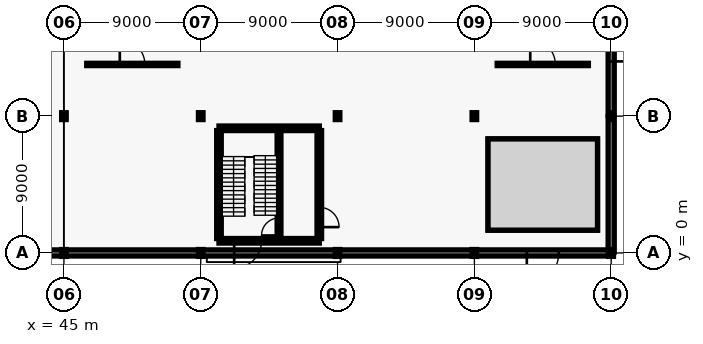
"""IFC4 building model, lengths in metres.
Left out: names, types, materials, properties, quantities, classifications, styles, units other than length and angle.
Written with IfcOpenShell. Run it as: python <this file> out.ifc"""

import sys

from ifc_helpers import new_model, si_unit, direction, frame, frame_2d, origin, origin_2d, place, context, subcontext, project, spatial, rectangle, i_section, extrude, element, fill, save


model = new_model("IFC4")
c1 = context("Model", 3, precision=1e-05, world=origin(), true_north=direction((0.0, 1.0)))
c2 = subcontext(c1, "Body", "Model", "MODEL_VIEW")
j1 = project(units=[si_unit("LENGTHUNIT", "METRE"), si_unit("PLANEANGLEUNIT", "RADIAN")], contexts=[c1])
p1 = place(None, origin())
s1 = spatial("IfcSite", under=j1, at=p1, CompositionType="ELEMENT")
p2 = place(p1, origin())
s2 = spatial("IfcBuilding", under=s1, at=p2, CompositionType="ELEMENT")
p3 = place(p2, origin())
s3 = spatial("IfcBuildingStorey", under=s2, at=p3, CompositionType="ELEMENT", Elevation=0.0)
for number, where, z_axis, x_axis in (
    (1, (45.0, 0.0, 0.0), (0.0, 0.0, 1.0), (1.0, 0.0, 0.0)),
    (2, (45.0, 9.0, 0.0), (0.0, 0.0, 1.0), (1.0, 0.0, 0.0)),
    (3, (54.0, 0.0, 0.0), (0.0, 0.0, 1.0), (1.0, 0.0, 0.0)),
    (4, (54.0, 9.0, 0.0), (0.0, 0.0, 1.0), (1.0, 0.0, 0.0)),
    (5, (63.0, 0.0, 0.0), (0.0, 0.0, 1.0), (1.0, 0.0, 0.0)),
    (6, (63.0, 9.0, 0.0), (0.0, 0.0, 1.0), (1.0, 0.0, 0.0)),
    (7, (72.0, 0.0, 0.0), (0.0, 0.0, 1.0), (1.0, 0.0, 0.0)),
    (8, (72.0, 9.0, 0.0), (0.0, 0.0, 1.0), (1.0, 0.0, 0.0)),
    (9, (81.0, 0.0, 0.0), (0.0, 0.0, 1.0), (1.0, 0.0, 0.0)),
    (10, (81.0, 9.0, 0.0), (0.0, 0.0, 1.0), (1.0, 0.0, 0.0)),
):
    element("IfcColumn", number, at=place(p3, frame(where, z_axis=z_axis, x_axis=x_axis)), inside=s3, PredefinedType="COLUMN", context=c2, shape_type="SweptSolid", body=[
        extrude(i_section(OverallWidth=0.3, OverallDepth=0.45, WebThickness=0.014, FlangeThickness=0.026, FilletRadius=0.027, at=origin_2d()), origin(), (0.0, 0.0, 1.0), 5.4),
    ])
p4 = place(p3, frame((36.06, 0.0, 0.0), z_axis=(0.0, 0.0, 1.0), x_axis=(1.0, 0.0, 0.0)))
e11 = element("IfcWall", 11, at=p4, inside=s3, PredefinedType="SOLIDWALL", context=c2, shape_type="SweptSolid", body=[
    extrude(rectangle(XDim=8.88, YDim=0.4, at=frame_2d((4.44, 0.0))), origin(), (0.0, 0.0, 1.0), 4.7),
])
p5 = place(p4, frame((3.24, 0.0, 0.0)))
e12 = element("IfcOpeningElement", 12, at=p5, cuts=e11, PredefinedType="OPENING", context=c2, shape_type="SweptSolid", body=[
    extrude(rectangle(XDim=2.4, YDim=2.5, at=frame_2d((1.2, 1.25))), frame((0.0, 0.21, 0.0), z_axis=(0.0, -1.0, 0.0), x_axis=(1.0, 0.0, 0.0)), (0.0, 0.0, 1.0), 0.42),
])
for number, where, z_axis, x_axis in (
    (13, (45.06, 0.0, 0.0), (0.0, 0.0, 1.0), (1.0, 0.0, 0.0)),
    (14, (54.06, 0.0, 0.0), (0.0, 0.0, 1.0), (1.0, 0.0, 0.0)),
    (15, (63.06, 0.0, 0.0), (0.0, 0.0, 1.0), (1.0, 0.0, 0.0)),
):
    element("IfcWall", number, at=place(p3, frame(where, z_axis=z_axis, x_axis=x_axis)), inside=s3, PredefinedType="SOLIDWALL", context=c2, shape_type="SweptSolid", body=[
        extrude(rectangle(XDim=8.88, YDim=0.4, at=frame_2d((4.44, 0.0))), origin(), (0.0, 0.0, 1.0), 4.7),
    ])
p6 = place(p3, frame((72.06, 0.0, 0.0), z_axis=(0.0, 0.0, 1.0), x_axis=(1.0, 0.0, 0.0)))
e16 = element("IfcWall", 16, at=p6, inside=s3, PredefinedType="SOLIDWALL", context=c2, shape_type="SweptSolid", body=[
    extrude(rectangle(XDim=8.88, YDim=0.4, at=frame_2d((4.44, 0.0))), origin(), (0.0, 0.0, 1.0), 4.7),
])
p7 = place(p6, frame((3.39, 0.0, 0.0)))
e17 = element("IfcOpeningElement", 17, at=p7, cuts=e16, PredefinedType="OPENING", context=c2, shape_type="SweptSolid", body=[
    extrude(rectangle(XDim=2.1, YDim=2.35, at=frame_2d((1.05, 1.175))), frame((0.0, 0.21, 0.0), z_axis=(0.0, -1.0, 0.0), x_axis=(1.0, 0.0, 0.0)), (0.0, 0.0, 1.0), 0.42),
])
p8 = place(p3, frame((81.0, 0.06, 0.0), z_axis=(0.0, 0.0, 1.0), x_axis=(0.0, 1.0, 0.0)))
e18 = element("IfcWall", 18, at=p8, inside=s3, PredefinedType="SOLIDWALL", context=c2, shape_type="SweptSolid", body=[
    extrude(rectangle(XDim=8.88, YDim=0.4, at=frame_2d((4.44, 0.0))), origin(), (0.0, 0.0, 1.0), 4.7),
])
p9 = place(p3, frame((81.0, 9.06, 0.0), z_axis=(0.0, 0.0, 1.0), x_axis=(0.0, 1.0, 0.0)))
e19 = element("IfcWall", 19, at=p9, inside=s3, PredefinedType="SOLIDWALL", context=c2, shape_type="SweptSolid", body=[
    extrude(rectangle(XDim=8.88, YDim=0.4, at=frame_2d((4.44, 0.0))), origin(), (0.0, 0.0, 1.0), 4.7),
])
p10 = place(p9, frame((3.54, 0.0, 0.0)))
e20 = element("IfcOpeningElement", 20, at=p10, cuts=e19, PredefinedType="OPENING", context=c2, shape_type="SweptSolid", body=[
    extrude(rectangle(XDim=1.8, YDim=2.2, at=frame_2d((0.9, 1.1))), frame((0.0, 0.21, 0.0), z_axis=(0.0, -1.0, 0.0), x_axis=(1.0, 0.0, 0.0)), (0.0, 0.0, 1.0), 0.42),
])
p11 = place(p3, frame((55.2, 0.8, 0.0), z_axis=(0.0, 0.0, 1.0), x_axis=(1.0, 0.0, 0.0)))
e21 = element("IfcWall", 21, at=p11, inside=s3, PredefinedType="SHEAR", context=c2, shape_type="SweptSolid", body=[
    extrude(rectangle(XDim=6.6, YDim=0.3, at=frame_2d((3.3, 0.0))), origin(), (0.0, 0.0, 1.0), 5.4),
])
p12 = place(p11, frame((1.0, 0.0, 0.0)))
e22 = element("IfcOpeningElement", 22, at=p12, cuts=e21, PredefinedType="OPENING", context=c2, shape_type="SweptSolid", body=[
    extrude(rectangle(XDim=1.8, YDim=2.15, at=frame_2d((0.9, 1.075))), frame((0.0, 0.16, 0.0), z_axis=(0.0, -1.0, 0.0), x_axis=(1.0, 0.0, 0.0)), (0.0, 0.0, 1.0), 0.32),
])
p13 = place(p3, frame((55.2, 8.2, 0.0), z_axis=(0.0, 0.0, 1.0), x_axis=(1.0, 0.0, 0.0)))
e23 = element("IfcWall", 23, at=p13, inside=s3, PredefinedType="SHEAR", context=c2, shape_type="SweptSolid", body=[
    extrude(rectangle(XDim=6.6, YDim=0.3, at=frame_2d((3.3, 0.0))), origin(), (0.0, 0.0, 1.0), 5.4),
])
p14 = place(p3, frame((55.2, 0.95, 0.0), z_axis=(0.0, 0.0, 1.0), x_axis=(0.0, 1.0, 0.0)))
e24 = element("IfcWall", 24, at=p14, inside=s3, PredefinedType="SHEAR", context=c2, shape_type="SweptSolid", body=[
    extrude(rectangle(XDim=7.1, YDim=0.3, at=frame_2d((3.55, 0.0))), origin(), (0.0, 0.0, 1.0), 5.4),
])
p15 = place(p3, frame((61.8, 0.95, 0.0), z_axis=(0.0, 0.0, 1.0), x_axis=(0.0, 1.0, 0.0)))
e25 = element("IfcWall", 25, at=p15, inside=s3, PredefinedType="SHEAR", context=c2, shape_type="SweptSolid", body=[
    extrude(rectangle(XDim=7.1, YDim=0.3, at=frame_2d((3.55, 0.0))), origin(), (0.0, 0.0, 1.0), 5.4),
])
p16 = place(p15, frame((0.75, 0.0, 0.0)))
e26 = element("IfcOpeningElement", 26, at=p16, cuts=e25, PredefinedType="OPENING", context=c2, shape_type="SweptSolid", body=[
    extrude(rectangle(XDim=1.3, YDim=2.15, at=frame_2d((0.65, 1.075))), frame((0.0, 0.16, 0.0), z_axis=(0.0, -1.0, 0.0), x_axis=(1.0, 0.0, 0.0)), (0.0, 0.0, 1.0), 0.32),
])
p17 = place(p3, frame((59.15, 0.95, 0.0), z_axis=(0.0, 0.0, 1.0), x_axis=(0.0, 1.0, 0.0)))
e27 = element("IfcWall", 27, at=p17, inside=s3, PredefinedType="SHEAR", context=c2, shape_type="SweptSolid", body=[
    extrude(rectangle(XDim=7.1, YDim=0.25, at=frame_2d((3.55, 0.0))), origin(), (0.0, 0.0, 1.0), 5.4),
])
p18 = place(p17, frame((0.2, 0.0, 0.0)))
e28 = element("IfcOpeningElement", 28, at=p18, cuts=e27, PredefinedType="OPENING", context=c2, shape_type="SweptSolid", body=[
    extrude(rectangle(XDim=1.15, YDim=2.15, at=frame_2d((0.575, 1.075))), frame((0.0, 0.135, 0.0), z_axis=(0.0, -1.0, 0.0), x_axis=(1.0, 0.0, 0.0)), (0.0, 0.0, 1.0), 0.27),
])
p19 = place(p3, frame((46.5, 12.4, 0.0), z_axis=(0.0, 0.0, 1.0), x_axis=(1.0, 0.0, 0.0)))
e29 = element("IfcWall", 29, at=p19, inside=s3, PredefinedType="PARTITIONING", context=c2, shape_type="SweptSolid", body=[
    extrude(rectangle(XDim=6.0, YDim=0.15, at=frame_2d((3.0, 0.0))), origin(), (0.0, 0.0, 1.0), 4.3),
])
p20 = place(p19, frame((2.175, 0.0, 0.0)))
e30 = element("IfcOpeningElement", 30, at=p20, cuts=e29, PredefinedType="OPENING", context=c2, shape_type="SweptSolid", body=[
    extrude(rectangle(XDim=1.65, YDim=2.25, at=frame_2d((0.825, 1.125))), frame((0.0, 0.085, 0.0), z_axis=(0.0, -1.0, 0.0), x_axis=(1.0, 0.0, 0.0)), (0.0, 0.0, 1.0), 0.17),
])
p21 = place(p3, frame((73.5, 12.4, 0.0), z_axis=(0.0, 0.0, 1.0), x_axis=(1.0, 0.0, 0.0)))
e31 = element("IfcWall", 31, at=p21, inside=s3, PredefinedType="PARTITIONING", context=c2, shape_type="SweptSolid", body=[
    extrude(rectangle(XDim=6.0, YDim=0.15, at=frame_2d((3.0, 0.0))), origin(), (0.0, 0.0, 1.0), 4.3),
])
p22 = place(p21, frame((2.175, 0.0, 0.0)))
e32 = element("IfcOpeningElement", 32, at=p22, cuts=e31, PredefinedType="OPENING", context=c2, shape_type="SweptSolid", body=[
    extrude(rectangle(XDim=1.65, YDim=2.25, at=frame_2d((0.825, 1.125))), frame((0.0, 0.085, 0.0), z_axis=(0.0, -1.0, 0.0), x_axis=(1.0, 0.0, 0.0)), (0.0, 0.0, 1.0), 0.17),
])
p23 = place(p7, frame((2.1, 0.0, 0.0), z_axis=(0.0, 0.0, 1.0), x_axis=(-1.0, 0.0, 0.0)))
e33 = element("IfcDoor", 33, at=p23, inside=s3, OperationType="DOUBLE_DOOR_SINGLE_SWING", PredefinedType="DOOR", context=c2, shape_type="SweptSolid", body=[
    extrude(rectangle(XDim=2.1, YDim=2.35, at=frame_2d((1.05, 1.175))), frame((0.0, 0.025, 0.0), z_axis=(0.0, -1.0, 0.0), x_axis=(1.0, 0.0, 0.0)), (0.0, 0.0, 1.0), 0.05),
])
fill(e17, e33)
p24 = place(p10, frame((1.8, 0.0, 0.0), z_axis=(0.0, 0.0, 1.0), x_axis=(-1.0, 0.0, 0.0)))
e34 = element("IfcDoor", 34, at=p24, inside=s3, OperationType="DOUBLE_DOOR_SINGLE_SWING", PredefinedType="DOOR", context=c2, shape_type="SweptSolid", body=[
    extrude(rectangle(XDim=1.8, YDim=2.2, at=frame_2d((0.9, 1.1))), frame((0.0, 0.025, 0.0), z_axis=(0.0, -1.0, 0.0), x_axis=(1.0, 0.0, 0.0)), (0.0, 0.0, 1.0), 0.05),
])
fill(e20, e34)
p25 = place(p16, frame((1.3, 0.0, 0.0), z_axis=(0.0, 0.0, 1.0), x_axis=(-1.0, 0.0, 0.0)))
e35 = element("IfcDoor", 35, at=p25, inside=s3, OperationType="DOUBLE_DOOR_SINGLE_SWING", PredefinedType="DOOR", context=c2, shape_type="SweptSolid", body=[
    extrude(rectangle(XDim=1.3, YDim=2.15, at=frame_2d((0.65, 1.075))), frame((0.0, 0.025, 0.0), z_axis=(0.0, -1.0, 0.0), x_axis=(1.0, 0.0, 0.0)), (0.0, 0.0, 1.0), 0.05),
])
fill(e26, e35)
p26 = place(p18, origin())
e36 = element("IfcDoor", 36, at=p26, inside=s3, OperationType="SINGLE_SWING_LEFT", PredefinedType="DOOR", context=c2, shape_type="SweptSolid", body=[
    extrude(rectangle(XDim=1.15, YDim=2.15, at=frame_2d((0.575, 1.075))), frame((0.0, 0.025, 0.0), z_axis=(0.0, -1.0, 0.0), x_axis=(1.0, 0.0, 0.0)), (0.0, 0.0, 1.0), 0.05),
])
fill(e28, e36)
p27 = place(p12, frame((1.8, 0.0, 0.0), z_axis=(0.0, 0.0, 1.0), x_axis=(-1.0, 0.0, 0.0)))
e37 = element("IfcDoor", 37, at=p27, inside=s3, OperationType="DOUBLE_DOOR_SINGLE_SWING", PredefinedType="DOOR", context=c2, shape_type="SweptSolid", body=[
    extrude(rectangle(XDim=1.8, YDim=2.15, at=frame_2d((0.9, 1.075))), frame((0.0, 0.025, 0.0), z_axis=(0.0, -1.0, 0.0), x_axis=(1.0, 0.0, 0.0)), (0.0, 0.0, 1.0), 0.05),
])
fill(e22, e37)
p28 = place(p20, origin())
e38 = element("IfcDoor", 38, at=p28, inside=s3, OperationType="DOUBLE_DOOR_SINGLE_SWING", PredefinedType="DOOR", context=c2, shape_type="SweptSolid", body=[
    extrude(rectangle(XDim=1.65, YDim=2.25, at=frame_2d((0.825, 1.125))), frame((0.0, 0.025, 0.0), z_axis=(0.0, -1.0, 0.0), x_axis=(1.0, 0.0, 0.0)), (0.0, 0.0, 1.0), 0.05),
])
fill(e30, e38)
p29 = place(p22, origin())
e39 = element("IfcDoor", 39, at=p29, inside=s3, OperationType="DOUBLE_DOOR_SINGLE_SWING", PredefinedType="DOOR", context=c2, shape_type="SweptSolid", body=[
    extrude(rectangle(XDim=1.65, YDim=2.25, at=frame_2d((0.825, 1.125))), frame((0.0, 0.025, 0.0), z_axis=(0.0, -1.0, 0.0), x_axis=(1.0, 0.0, 0.0)), (0.0, 0.0, 1.0), 0.05),
])
fill(e32, e39)
save(model, sys.argv[1])
